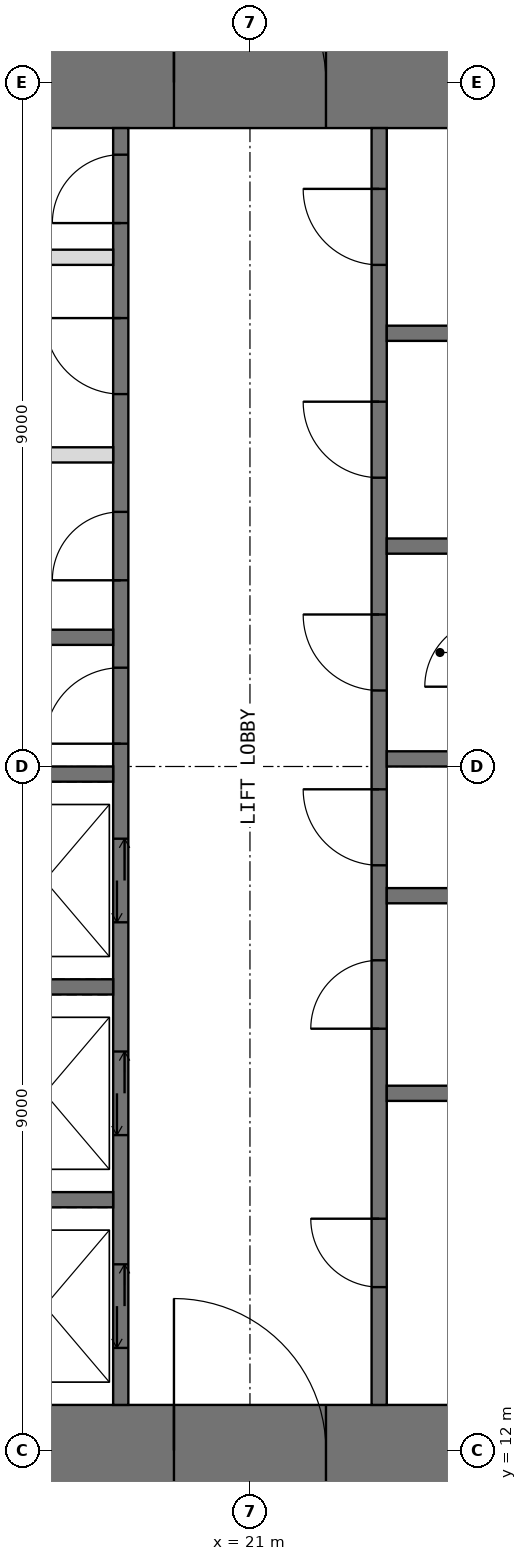
"""IFC4 building model, lengths in metres.
Left out: names, types, materials, properties, quantities, classifications, styles, units other than length and angle.
Written with IfcOpenShell. Run it as: python <this file> out.ifc"""

import sys

from ifc_helpers import new_model, si_unit, direction, frame, frame_2d, origin, place, context, subcontext, project, spatial, rectangle, extrude, element, fill, save


model = new_model("IFC4")
c1 = context("Model", 3, precision=1e-05, world=origin(), true_north=direction((0.0, 1.0)))
c2 = subcontext(c1, "Body", "Model", "MODEL_VIEW")
j1 = project(units=[si_unit("LENGTHUNIT", "METRE"), si_unit("PLANEANGLEUNIT", "RADIAN")], contexts=[c1])
p1 = place(None, origin())
s1 = spatial("IfcSite", under=j1, at=p1, CompositionType="ELEMENT")
p2 = place(p1, origin())
s2 = spatial("IfcBuilding", under=s1, at=p2, CompositionType="ELEMENT")
p3 = place(p2, frame((0.0, 0.0, 265.0)))
s3 = spatial("IfcBuildingStorey", under=s2, at=p3, CompositionType="ELEMENT", Elevation=265.0)
p4 = place(p3, frame((11.4, 12.0, -0.05), z_axis=(0.0, 0.0, 1.0), x_axis=(1.0, 0.0, 0.0)))
e1 = element("IfcWall", 1, at=p4, inside=s3, PredefinedType="SHEAR", context=c2, shape_type="SweptSolid", body=[
    extrude(rectangle(XDim=19.2, YDim=1.2, at=frame_2d((9.6, 0.0))), origin(), (0.0, 0.0, 1.0), 4.2),
])
p5 = place(p4, frame((8.6, 0.0, 0.05)))
e2 = element("IfcOpeningElement", 2, at=p5, cuts=e1, PredefinedType="OPENING", context=c2, shape_type="SweptSolid", body=[
    extrude(rectangle(XDim=2.0, YDim=2.2, at=frame_2d((1.0, 1.1))), frame((0.0, 0.61, 0.0), z_axis=(0.0, -1.0, 0.0), x_axis=(1.0, 0.0, 0.0)), (0.0, 0.0, 1.0), 1.22),
])
p6 = place(p3, frame((11.4, 30.0, -0.05), z_axis=(0.0, 0.0, 1.0), x_axis=(1.0, 0.0, 0.0)))
e3 = element("IfcWall", 3, at=p6, inside=s3, PredefinedType="SHEAR", context=c2, shape_type="SweptSolid", body=[
    extrude(rectangle(XDim=19.2, YDim=1.2, at=frame_2d((9.6, 0.0))), origin(), (0.0, 0.0, 1.0), 4.2),
])
p7 = place(p6, frame((8.6, 0.0, 0.05)))
e4 = element("IfcOpeningElement", 4, at=p7, cuts=e3, PredefinedType="OPENING", context=c2, shape_type="SweptSolid", body=[
    extrude(rectangle(XDim=2.0, YDim=2.2, at=frame_2d((1.0, 1.1))), frame((0.0, 0.61, 0.0), z_axis=(0.0, -1.0, 0.0), x_axis=(1.0, 0.0, 0.0)), (0.0, 0.0, 1.0), 1.22),
])
p8 = place(p3, frame((19.3, 12.6, -0.05), z_axis=(0.0, 0.0, 1.0), x_axis=(0.0, 1.0, 0.0)))
e5 = element("IfcWall", 5, at=p8, inside=s3, PredefinedType="SHEAR", context=c2, shape_type="SweptSolid", body=[
    extrude(rectangle(XDim=16.8, YDim=0.2, at=frame_2d((8.4, 0.0))), origin(), (0.0, 0.0, 1.0), 4.2),
])
p9 = place(p8, frame((8.7, 0.0, 0.05)))
e6 = element("IfcOpeningElement", 6, at=p9, cuts=e5, PredefinedType="OPENING", context=c2, shape_type="SweptSolid", body=[
    extrude(rectangle(XDim=1.0, YDim=2.2, at=frame_2d((0.5, 1.1))), frame((0.0, 0.11, 0.0), z_axis=(0.0, -1.0, 0.0), x_axis=(1.0, 0.0, 0.0)), (0.0, 0.0, 1.0), 0.22),
])
p10 = place(p8, frame((10.85, 0.0, 0.05)))
e7 = element("IfcOpeningElement", 7, at=p10, cuts=e5, PredefinedType="OPENING", context=c2, shape_type="SweptSolid", body=[
    extrude(rectangle(XDim=0.9, YDim=2.2, at=frame_2d((0.45, 1.1))), frame((0.0, 0.11, 0.0), z_axis=(0.0, -1.0, 0.0), x_axis=(1.0, 0.0, 0.0)), (0.0, 0.0, 1.0), 0.22),
])
p11 = place(p8, frame((13.3, 0.0, 0.05)))
e8 = element("IfcOpeningElement", 8, at=p11, cuts=e5, PredefinedType="OPENING", context=c2, shape_type="SweptSolid", body=[
    extrude(rectangle(XDim=1.0, YDim=2.2, at=frame_2d((0.5, 1.1))), frame((0.0, 0.11, 0.0), z_axis=(0.0, -1.0, 0.0), x_axis=(1.0, 0.0, 0.0)), (0.0, 0.0, 1.0), 0.22),
])
p12 = place(p8, frame((15.55, 0.0, 0.05)))
e9 = element("IfcOpeningElement", 9, at=p12, cuts=e5, PredefinedType="OPENING", context=c2, shape_type="SweptSolid", body=[
    extrude(rectangle(XDim=0.9, YDim=2.2, at=frame_2d((0.45, 1.1))), frame((0.0, 0.11, 0.0), z_axis=(0.0, -1.0, 0.0), x_axis=(1.0, 0.0, 0.0)), (0.0, 0.0, 1.0), 0.22),
])
p13 = place(p8, frame((0.75, 0.0, 0.05)))
e10 = element("IfcOpeningElement", 10, at=p13, cuts=e5, PredefinedType="OPENING", context=c2, shape_type="SweptSolid", body=[
    extrude(rectangle(XDim=1.1, YDim=2.2, at=frame_2d((0.55, 1.1))), frame((0.0, 0.11, 0.0), z_axis=(0.0, -1.0, 0.0), x_axis=(1.0, 0.0, 0.0)), (0.0, 0.0, 1.0), 0.22),
])
p14 = place(p8, frame((3.55, 0.0, 0.05)))
e11 = element("IfcOpeningElement", 11, at=p14, cuts=e5, PredefinedType="OPENING", context=c2, shape_type="SweptSolid", body=[
    extrude(rectangle(XDim=1.1, YDim=2.2, at=frame_2d((0.55, 1.1))), frame((0.0, 0.11, 0.0), z_axis=(0.0, -1.0, 0.0), x_axis=(1.0, 0.0, 0.0)), (0.0, 0.0, 1.0), 0.22),
])
p15 = place(p8, frame((6.35, 0.0, 0.05)))
e12 = element("IfcOpeningElement", 12, at=p15, cuts=e5, PredefinedType="OPENING", context=c2, shape_type="SweptSolid", body=[
    extrude(rectangle(XDim=1.1, YDim=2.2, at=frame_2d((0.55, 1.1))), frame((0.0, 0.11, 0.0), z_axis=(0.0, -1.0, 0.0), x_axis=(1.0, 0.0, 0.0)), (0.0, 0.0, 1.0), 0.22),
])
p16 = place(p3, frame((22.7, 12.6, -0.05), z_axis=(0.0, 0.0, 1.0), x_axis=(0.0, 1.0, 0.0)))
e13 = element("IfcWall", 13, at=p16, inside=s3, PredefinedType="SHEAR", context=c2, shape_type="SweptSolid", body=[
    extrude(rectangle(XDim=16.8, YDim=0.2, at=frame_2d((8.4, 0.0))), origin(), (0.0, 0.0, 1.0), 4.2),
])
p17 = place(p16, frame((7.1, 0.0, 0.05)))
e14 = element("IfcOpeningElement", 14, at=p17, cuts=e13, PredefinedType="OPENING", context=c2, shape_type="SweptSolid", body=[
    extrude(rectangle(XDim=1.0, YDim=2.2, at=frame_2d((0.5, 1.1))), frame((0.0, 0.11, 0.0), z_axis=(0.0, -1.0, 0.0), x_axis=(1.0, 0.0, 0.0)), (0.0, 0.0, 1.0), 0.22),
])
p18 = place(p16, frame((1.55, 0.0, 0.05)))
e15 = element("IfcOpeningElement", 15, at=p18, cuts=e13, PredefinedType="OPENING", context=c2, shape_type="SweptSolid", body=[
    extrude(rectangle(XDim=0.9, YDim=2.2, at=frame_2d((0.45, 1.1))), frame((0.0, 0.11, 0.0), z_axis=(0.0, -1.0, 0.0), x_axis=(1.0, 0.0, 0.0)), (0.0, 0.0, 1.0), 0.22),
])
p19 = place(p16, frame((4.95, 0.0, 0.05)))
e16 = element("IfcOpeningElement", 16, at=p19, cuts=e13, PredefinedType="OPENING", context=c2, shape_type="SweptSolid", body=[
    extrude(rectangle(XDim=0.9, YDim=2.2, at=frame_2d((0.45, 1.1))), frame((0.0, 0.11, 0.0), z_axis=(0.0, -1.0, 0.0), x_axis=(1.0, 0.0, 0.0)), (0.0, 0.0, 1.0), 0.22),
])
p20 = place(p16, frame((9.4, 0.0, 0.05)))
e17 = element("IfcOpeningElement", 17, at=p20, cuts=e13, PredefinedType="OPENING", context=c2, shape_type="SweptSolid", body=[
    extrude(rectangle(XDim=1.0, YDim=2.2, at=frame_2d((0.5, 1.1))), frame((0.0, 0.11, 0.0), z_axis=(0.0, -1.0, 0.0), x_axis=(1.0, 0.0, 0.0)), (0.0, 0.0, 1.0), 0.22),
])
p21 = place(p16, frame((12.2, 0.0, 0.05)))
e18 = element("IfcOpeningElement", 18, at=p21, cuts=e13, PredefinedType="OPENING", context=c2, shape_type="SweptSolid", body=[
    extrude(rectangle(XDim=1.0, YDim=2.2, at=frame_2d((0.5, 1.1))), frame((0.0, 0.11, 0.0), z_axis=(0.0, -1.0, 0.0), x_axis=(1.0, 0.0, 0.0)), (0.0, 0.0, 1.0), 0.22),
])
p22 = place(p16, frame((15.0, 0.0, 0.05)))
e19 = element("IfcOpeningElement", 19, at=p22, cuts=e13, PredefinedType="OPENING", context=c2, shape_type="SweptSolid", body=[
    extrude(rectangle(XDim=1.0, YDim=2.2, at=frame_2d((0.5, 1.1))), frame((0.0, 0.11, 0.0), z_axis=(0.0, -1.0, 0.0), x_axis=(1.0, 0.0, 0.0)), (0.0, 0.0, 1.0), 0.22),
])
for number, where, z_axis, x_axis in (
    (20, (16.0, 15.3, -0.05), (0.0, 0.0, 1.0), (1.0, 0.0, 0.0)),
    (21, (16.0, 18.1, -0.05), (0.0, 0.0, 1.0), (1.0, 0.0, 0.0)),
    (22, (16.0, 20.9, -0.05), (0.0, 0.0, 1.0), (1.0, 0.0, 0.0)),
    (23, (16.0, 22.7, -0.05), (0.0, 0.0, 1.0), (1.0, 0.0, 0.0)),
):
    element("IfcWall", number, at=place(p3, frame(where, z_axis=z_axis, x_axis=x_axis)), inside=s3, PredefinedType="SHEAR", context=c2, shape_type="SweptSolid", body=[
        extrude(rectangle(XDim=3.2, YDim=0.2, at=frame_2d((1.6, 0.0))), origin(), (0.0, 0.0, 1.0), 4.2),
    ])
for number, where, z_axis, x_axis in (
    (24, (16.0, 25.1, 0.0), (0.0, 0.0, 1.0), (1.0, 0.0, 0.0)),
    (25, (16.0, 27.7, 0.0), (0.0, 0.0, 1.0), (1.0, 0.0, 0.0)),
):
    element("IfcWall", number, at=place(p3, frame(where, z_axis=z_axis, x_axis=x_axis)), inside=s3, PredefinedType="PARTITIONING", context=c2, shape_type="SweptSolid", body=[
        extrude(rectangle(XDim=3.2, YDim=0.2, at=frame_2d((1.6, 0.0))), origin(), (0.0, 0.0, 1.0), 3.95),
    ])
for number, where, z_axis, x_axis in (
    (26, (22.8, 16.7, -0.05), (0.0, 0.0, 1.0), (1.0, 0.0, 0.0)),
    (27, (22.8, 19.3, -0.05), (0.0, 0.0, 1.0), (1.0, 0.0, 0.0)),
    (28, (22.8, 21.1, -0.05), (0.0, 0.0, 1.0), (1.0, 0.0, 0.0)),
    (29, (22.8, 23.9, -0.05), (0.0, 0.0, 1.0), (1.0, 0.0, 0.0)),
    (30, (22.8, 26.7, -0.05), (0.0, 0.0, 1.0), (1.0, 0.0, 0.0)),
):
    element("IfcWall", number, at=place(p3, frame(where, z_axis=z_axis, x_axis=x_axis)), inside=s3, PredefinedType="SHEAR", context=c2, shape_type="SweptSolid", body=[
        extrude(rectangle(XDim=3.2, YDim=0.2, at=frame_2d((1.6, 0.0))), origin(), (0.0, 0.0, 1.0), 4.2),
    ])
p23 = place(p5, origin())
e31 = element("IfcDoor", 31, at=p23, inside=s3, OperationType="DOUBLE_DOOR_SINGLE_SWING", PredefinedType="DOOR", context=c2, shape_type="SweptSolid", body=[
    extrude(rectangle(XDim=2.0, YDim=2.2, at=frame_2d((1.0, 1.1))), frame((0.0, 0.025, 0.0), z_axis=(0.0, -1.0, 0.0), x_axis=(1.0, 0.0, 0.0)), (0.0, 0.0, 1.0), 0.05),
])
fill(e2, e31)
p24 = place(p7, origin())
e32 = element("IfcDoor", 32, at=p24, inside=s3, OperationType="DOUBLE_DOOR_SINGLE_SWING", PredefinedType="DOOR", context=c2, shape_type="SweptSolid", body=[
    extrude(rectangle(XDim=2.0, YDim=2.2, at=frame_2d((1.0, 1.1))), frame((0.0, 0.025, 0.0), z_axis=(0.0, -1.0, 0.0), x_axis=(1.0, 0.0, 0.0)), (0.0, 0.0, 1.0), 0.05),
])
fill(e4, e32)
p25 = place(p9, origin())
e33 = element("IfcDoor", 33, at=p25, inside=s3, OperationType="SINGLE_SWING_LEFT", PredefinedType="DOOR", context=c2, shape_type="SweptSolid", body=[
    extrude(rectangle(XDim=1.0, YDim=2.2, at=frame_2d((0.5, 1.1))), frame((0.0, 0.025, 0.0), z_axis=(0.0, -1.0, 0.0), x_axis=(1.0, 0.0, 0.0)), (0.0, 0.0, 1.0), 0.05),
])
fill(e6, e33)
p26 = place(p17, origin())
e34 = element("IfcDoor", 34, at=p26, inside=s3, OperationType="SINGLE_SWING_RIGHT", PredefinedType="DOOR", context=c2, shape_type="SweptSolid", body=[
    extrude(rectangle(XDim=1.0, YDim=2.2, at=frame_2d((0.5, 1.1))), frame((0.0, 0.025, 0.0), z_axis=(0.0, -1.0, 0.0), x_axis=(1.0, 0.0, 0.0)), (0.0, 0.0, 1.0), 0.05),
])
fill(e14, e34)
p27 = place(p10, origin())
e35 = element("IfcDoor", 35, at=p27, inside=s3, OperationType="SINGLE_SWING_LEFT", PredefinedType="DOOR", context=c2, shape_type="SweptSolid", body=[
    extrude(rectangle(XDim=0.9, YDim=2.2, at=frame_2d((0.45, 1.1))), frame((0.0, 0.025, 0.0), z_axis=(0.0, -1.0, 0.0), x_axis=(1.0, 0.0, 0.0)), (0.0, 0.0, 1.0), 0.05),
])
fill(e7, e35)
p28 = place(p11, origin())
e36 = element("IfcDoor", 36, at=p28, inside=s3, OperationType="SINGLE_SWING_RIGHT", PredefinedType="DOOR", context=c2, shape_type="SweptSolid", body=[
    extrude(rectangle(XDim=1.0, YDim=2.2, at=frame_2d((0.5, 1.1))), frame((0.0, 0.025, 0.0), z_axis=(0.0, -1.0, 0.0), x_axis=(1.0, 0.0, 0.0)), (0.0, 0.0, 1.0), 0.05),
])
fill(e8, e36)
p29 = place(p12, origin())
e37 = element("IfcDoor", 37, at=p29, inside=s3, OperationType="SINGLE_SWING_LEFT", PredefinedType="DOOR", context=c2, shape_type="SweptSolid", body=[
    extrude(rectangle(XDim=0.9, YDim=2.2, at=frame_2d((0.45, 1.1))), frame((0.0, 0.025, 0.0), z_axis=(0.0, -1.0, 0.0), x_axis=(1.0, 0.0, 0.0)), (0.0, 0.0, 1.0), 0.05),
])
fill(e9, e37)
p30 = place(p18, origin())
e38 = element("IfcDoor", 38, at=p30, inside=s3, OperationType="SINGLE_SWING_RIGHT", PredefinedType="DOOR", context=c2, shape_type="SweptSolid", body=[
    extrude(rectangle(XDim=0.9, YDim=2.2, at=frame_2d((0.45, 1.1))), frame((0.0, 0.025, 0.0), z_axis=(0.0, -1.0, 0.0), x_axis=(1.0, 0.0, 0.0)), (0.0, 0.0, 1.0), 0.05),
])
fill(e15, e38)
p31 = place(p19, origin())
e39 = element("IfcDoor", 39, at=p31, inside=s3, OperationType="SINGLE_SWING_LEFT", PredefinedType="DOOR", context=c2, shape_type="SweptSolid", body=[
    extrude(rectangle(XDim=0.9, YDim=2.2, at=frame_2d((0.45, 1.1))), frame((0.0, 0.025, 0.0), z_axis=(0.0, -1.0, 0.0), x_axis=(1.0, 0.0, 0.0)), (0.0, 0.0, 1.0), 0.05),
])
fill(e16, e39)
p32 = place(p20, origin())
e40 = element("IfcDoor", 40, at=p32, inside=s3, OperationType="SINGLE_SWING_RIGHT", PredefinedType="DOOR", context=c2, shape_type="SweptSolid", body=[
    extrude(rectangle(XDim=1.0, YDim=2.2, at=frame_2d((0.5, 1.1))), frame((0.0, 0.025, 0.0), z_axis=(0.0, -1.0, 0.0), x_axis=(1.0, 0.0, 0.0)), (0.0, 0.0, 1.0), 0.05),
])
fill(e17, e40)
p33 = place(p21, origin())
e41 = element("IfcDoor", 41, at=p33, inside=s3, OperationType="SINGLE_SWING_RIGHT", PredefinedType="DOOR", context=c2, shape_type="SweptSolid", body=[
    extrude(rectangle(XDim=1.0, YDim=2.2, at=frame_2d((0.5, 1.1))), frame((0.0, 0.025, 0.0), z_axis=(0.0, -1.0, 0.0), x_axis=(1.0, 0.0, 0.0)), (0.0, 0.0, 1.0), 0.05),
])
fill(e18, e41)
p34 = place(p22, origin())
e42 = element("IfcDoor", 42, at=p34, inside=s3, OperationType="SINGLE_SWING_RIGHT", PredefinedType="DOOR", context=c2, shape_type="SweptSolid", body=[
    extrude(rectangle(XDim=1.0, YDim=2.2, at=frame_2d((0.5, 1.1))), frame((0.0, 0.025, 0.0), z_axis=(0.0, -1.0, 0.0), x_axis=(1.0, 0.0, 0.0)), (0.0, 0.0, 1.0), 0.05),
])
fill(e19, e42)
p35 = place(p13, origin())
e43 = element("IfcDoor", 43, at=p35, inside=s3, OperationType="DOUBLE_DOOR_SLIDING", PredefinedType="DOOR", context=c2, shape_type="SweptSolid", body=[
    extrude(rectangle(XDim=1.1, YDim=2.2, at=frame_2d((0.55, 1.1))), frame((0.0, 0.025, 0.0), z_axis=(0.0, -1.0, 0.0), x_axis=(1.0, 0.0, 0.0)), (0.0, 0.0, 1.0), 0.05),
])
fill(e10, e43)
p36 = place(p14, origin())
e44 = element("IfcDoor", 44, at=p36, inside=s3, OperationType="DOUBLE_DOOR_SLIDING", PredefinedType="DOOR", context=c2, shape_type="SweptSolid", body=[
    extrude(rectangle(XDim=1.1, YDim=2.2, at=frame_2d((0.55, 1.1))), frame((0.0, 0.025, 0.0), z_axis=(0.0, -1.0, 0.0), x_axis=(1.0, 0.0, 0.0)), (0.0, 0.0, 1.0), 0.05),
])
fill(e11, e44)
p37 = place(p15, origin())
e45 = element("IfcDoor", 45, at=p37, inside=s3, OperationType="DOUBLE_DOOR_SLIDING", PredefinedType="DOOR", context=c2, shape_type="SweptSolid", body=[
    extrude(rectangle(XDim=1.1, YDim=2.2, at=frame_2d((0.55, 1.1))), frame((0.0, 0.025, 0.0), z_axis=(0.0, -1.0, 0.0), x_axis=(1.0, 0.0, 0.0)), (0.0, 0.0, 1.0), 0.05),
])
fill(e12, e45)
save(model, sys.argv[1])
